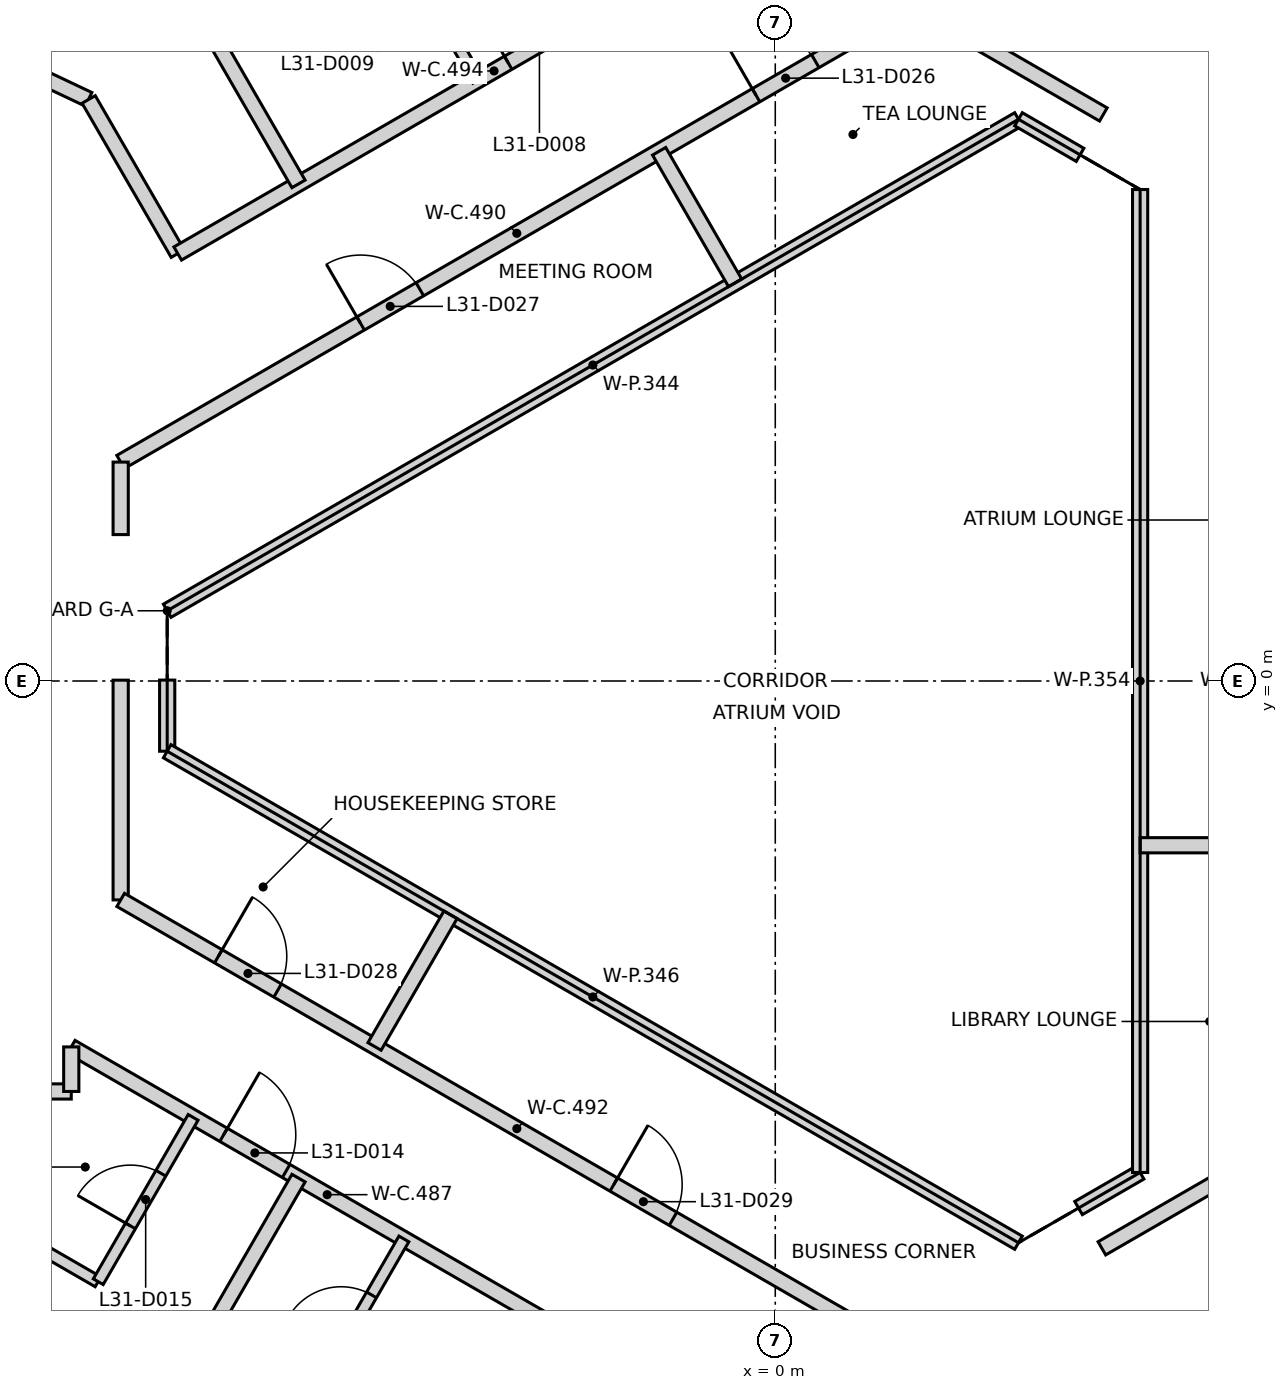
"""IFC4 building model, lengths in metres.
Left out: names, types, materials, properties, quantities, classifications, styles, units other than length and angle.
Written with IfcOpenShell. Run it as: python <this file> out.ifc"""

import sys

from ifc_helpers import new_model, si_unit, direction, frame, frame_2d, origin, place, context, subcontext, project, spatial, rectangle, extrude, element, fill, save


model = new_model("IFC4")
c1 = context("Model", 3, precision=1e-05, world=origin(), true_north=direction((0.0, 1.0)))
c2 = subcontext(c1, "Body", "Model", "MODEL_VIEW")
j1 = project(units=[si_unit("LENGTHUNIT", "METRE"), si_unit("PLANEANGLEUNIT", "RADIAN")], contexts=[c1])
p1 = place(None, origin())
s1 = spatial("IfcSite", under=j1, at=p1, CompositionType="ELEMENT")
p2 = place(p1, origin())
s2 = spatial("IfcBuilding", under=s1, at=p2, CompositionType="ELEMENT")
p3 = place(p2, frame((0.0, 0.0, 128.8)))
s3 = spatial("IfcBuildingStorey", under=s2, at=p3, CompositionType="ELEMENT", Elevation=128.8)
p4 = place(p3, frame((10.42, 6.498, 0.0), z_axis=(0.0, 0.0, 1.0), x_axis=(-0.866021906294, 0.500006057782, 0.0)))
e1 = element("IfcWall", 1, at=p4, inside=s3, PredefinedType="SHEAR", context=c2, shape_type="SweptSolid", body=[
    extrude(rectangle(XDim=11.55, YDim=0.25, at=frame_2d((5.775, 0.0))), origin(), (0.0, 0.0, 1.0), 3.2),
])
p5 = place(p4, frame((10.025, 0.0, 0.0)))
e2 = element("IfcOpeningElement", 2, at=p5, cuts=e1, PredefinedType="OPENING", context=c2, shape_type="SweptSolid", body=[
    extrude(rectangle(XDim=1.2, YDim=2.1, at=frame_2d((0.6, 1.05))), frame((0.0, 0.135, 0.0), z_axis=(0.0, -1.0, 0.0), x_axis=(1.0, 0.0, 0.0)), (0.0, 0.0, 1.0), 0.27),
])
p6 = place(p4, frame((8.725, 0.0, 0.0)))
e3 = element("IfcOpeningElement", 3, at=p6, cuts=e1, PredefinedType="OPENING", context=c2, shape_type="SweptSolid", body=[
    extrude(rectangle(XDim=1.2, YDim=2.1, at=frame_2d((0.6, 1.05))), frame((0.0, 0.135, 0.0), z_axis=(0.0, -1.0, 0.0), x_axis=(1.0, 0.0, 0.0)), (0.0, 0.0, 1.0), 0.27),
])
p7 = place(p3, frame((0.417, -12.273, 0.0), z_axis=(0.0, 0.0, 1.0), x_axis=(0.866021906294, 0.500006057782, 0.0)))
e4 = element("IfcWall", 4, at=p7, inside=s3, PredefinedType="SHEAR", context=c2, shape_type="SweptSolid", body=[
    extrude(rectangle(XDim=11.55, YDim=0.25, at=frame_2d((5.775, 0.0))), origin(), (0.0, 0.0, 1.0), 3.2),
])
p8 = place(p7, frame((10.025, 0.0, 0.0)))
e5 = element("IfcOpeningElement", 5, at=p8, cuts=e4, PredefinedType="OPENING", context=c2, shape_type="SweptSolid", body=[
    extrude(rectangle(XDim=1.2, YDim=2.1, at=frame_2d((0.6, 1.05))), frame((0.0, 0.135, 0.0), z_axis=(0.0, -1.0, 0.0), x_axis=(1.0, 0.0, 0.0)), (0.0, 0.0, 1.0), 0.27),
])
p9 = place(p7, frame((8.725, 0.0, 0.0)))
e6 = element("IfcOpeningElement", 6, at=p9, cuts=e4, PredefinedType="OPENING", context=c2, shape_type="SweptSolid", body=[
    extrude(rectangle(XDim=1.2, YDim=2.1, at=frame_2d((0.6, 1.05))), frame((0.0, 0.135, 0.0), z_axis=(0.0, -1.0, 0.0), x_axis=(1.0, 0.0, 0.0)), (0.0, 0.0, 1.0), 0.27),
])
p10 = place(p3, frame((-10.617, -5.4, 0.0), z_axis=(0.0, 0.0, 1.0), x_axis=(1.0, 0.0, 0.0)))
e7 = element("IfcWall", 7, at=p10, inside=s3, PredefinedType="PARTITIONING", context=c2, shape_type="SweptSolid", body=[
    extrude(rectangle(XDim=1.355, YDim=0.2, at=frame_2d((0.677, 0.0))), origin(), (0.0, 0.0, 1.0), 3.2),
])
p11 = place(p3, frame((-10.141, 8.176, 0.0), z_axis=(0.0, 0.0, 1.0), x_axis=(0.903904169039, -0.427735026849, 0.0)))
e8 = element("IfcWall", 8, at=p11, inside=s3, PredefinedType="PARTITIONING", context=c2, shape_type="SweptSolid", body=[
    extrude(rectangle(XDim=1.225, YDim=0.2, at=frame_2d((0.612, 0.0))), origin(), (0.0, 0.0, 1.0), 3.2),
])
p12 = place(p3, frame((-9.262, -4.814, 0.0), z_axis=(0.0, 0.0, 1.0), x_axis=(0.866109782156, -0.499853823887, 0.0)))
e9 = element("IfcWall", 9, at=p12, inside=s3, PredefinedType="PARTITIONING", context=c2, shape_type="SweptSolid", body=[
    extrude(rectangle(XDim=7.776, YDim=0.2, at=frame_2d((3.888, 0.0))), origin(), (0.0, 0.0, 1.0), 3.2),
])
p13 = place(p12, frame((2.314, 0.0, 0.0)))
e10 = element("IfcOpeningElement", 10, at=p13, cuts=e9, PredefinedType="OPENING", context=c2, shape_type="SweptSolid", body=[
    extrude(rectangle(XDim=0.95, YDim=2.1, at=frame_2d((0.475, 1.05))), frame((0.0, 0.11, 0.0), z_axis=(0.0, -1.0, 0.0), x_axis=(1.0, 0.0, 0.0)), (0.0, 0.0, 1.0), 0.22),
])
p14 = place(p3, frame((-9.262, -5.4, 0.0), z_axis=(0.0, 0.0, 1.0), x_axis=(0.0, 1.0, 0.0)))
e11 = element("IfcWall", 11, at=p14, inside=s3, PredefinedType="PARTITIONING", context=c2, shape_type="SweptSolid", body=[
    extrude(rectangle(XDim=0.586, YDim=0.2, at=frame_2d((0.293, 0.0))), origin(), (0.0, 0.0, 1.0), 3.2),
])
p15 = place(p3, frame((-9.033, 7.651, 0.0), z_axis=(0.0, 0.0, 1.0), x_axis=(0.500354010599, -0.865820919173, 0.0)))
e12 = element("IfcWall", 12, at=p15, inside=s3, PredefinedType="PARTITIONING", context=c2, shape_type="SweptSolid", body=[
    extrude(rectangle(XDim=2.342, YDim=0.2, at=frame_2d((1.171, 0.0))), origin(), (0.0, 0.0, 1.0), 3.2),
])
p16 = place(p3, frame((-8.613, 2.881, 0.0), z_axis=(0.0, 0.0, 1.0), x_axis=(0.866103179807, 0.499865263774, 0.0)))
e13 = element("IfcWall", 13, at=p16, inside=s3, PredefinedType="PARTITIONING", context=c2, shape_type="SweptSolid", body=[
    extrude(rectangle(XDim=12.036, YDim=0.2, at=frame_2d((6.018, 0.0))), origin(), (0.0, 0.0, 1.0), 3.2),
])
p17 = place(p16, frame((9.652, 0.0, 0.0)))
e14 = element("IfcOpeningElement", 14, at=p17, cuts=e13, PredefinedType="OPENING", context=c2, shape_type="SweptSolid", body=[
    extrude(rectangle(XDim=0.9, YDim=2.1, at=frame_2d((0.45, 1.05))), frame((0.0, 0.11, 0.0), z_axis=(0.0, -1.0, 0.0), x_axis=(1.0, 0.0, 0.0)), (0.0, 0.0, 1.0), 0.22),
])
p18 = place(p16, frame((3.646, 0.0, 0.0)))
e15 = element("IfcOpeningElement", 15, at=p18, cuts=e13, PredefinedType="OPENING", context=c2, shape_type="SweptSolid", body=[
    extrude(rectangle(XDim=0.9, YDim=2.1, at=frame_2d((0.45, 1.05))), frame((0.0, 0.11, 0.0), z_axis=(0.0, -1.0, 0.0), x_axis=(1.0, 0.0, 0.0)), (0.0, 0.0, 1.0), 0.22),
])
p19 = place(p3, frame((-8.612, -2.88, 0.0), z_axis=(0.0, 0.0, 1.0), x_axis=(0.0, 1.0, 0.0)))
e16 = element("IfcWall", 16, at=p19, inside=s3, PredefinedType="PARTITIONING", context=c2, shape_type="SweptSolid", body=[
    extrude(rectangle(XDim=2.891, YDim=0.2, at=frame_2d((1.445, 0.0))), origin(), (0.0, 0.0, 1.0), 2.3),
])
p20 = place(p3, frame((-8.612, -2.88, 0.0), z_axis=(0.0, 0.0, 1.0), x_axis=(0.866035279512, -0.499982894348, 0.0)))
e17 = element("IfcWall", 17, at=p20, inside=s3, PredefinedType="PARTITIONING", context=c2, shape_type="SweptSolid", body=[
    extrude(rectangle(XDim=12.037, YDim=0.2, at=frame_2d((6.018, 0.0))), origin(), (0.0, 0.0, 1.0), 3.2),
])
p21 = place(p20, frame((1.484, 0.0, 0.0)))
e18 = element("IfcOpeningElement", 18, at=p21, cuts=e17, PredefinedType="OPENING", context=c2, shape_type="SweptSolid", body=[
    extrude(rectangle(XDim=0.9, YDim=2.1, at=frame_2d((0.45, 1.05))), frame((0.0, 0.11, 0.0), z_axis=(0.0, -1.0, 0.0), x_axis=(1.0, 0.0, 0.0)), (0.0, 0.0, 1.0), 0.22),
])
p22 = place(p20, frame((7.491, 0.0, 0.0)))
e19 = element("IfcOpeningElement", 19, at=p22, cuts=e17, PredefinedType="OPENING", context=c2, shape_type="SweptSolid", body=[
    extrude(rectangle(XDim=0.9, YDim=2.1, at=frame_2d((0.45, 1.05))), frame((0.0, 0.11, 0.0), z_axis=(0.0, -1.0, 0.0), x_axis=(1.0, 0.0, 0.0)), (0.0, 0.0, 1.0), 0.22),
])
p23 = place(p3, frame((-8.612, 1.926, 0.0), z_axis=(0.0, 0.0, 1.0), x_axis=(0.0, 1.0, 0.0)))
e20 = element("IfcWall", 20, at=p23, inside=s3, PredefinedType="PARTITIONING", context=c2, shape_type="SweptSolid", body=[
    extrude(rectangle(XDim=0.954, YDim=0.2, at=frame_2d((0.477, 0.0))), origin(), (0.0, 0.0, 1.0), 3.2),
])
p24 = place(p3, frame((-7.862, 5.624, 0.0), z_axis=(0.0, 0.0, 1.0), x_axis=(0.866109024618, 0.499855136491, 0.0)))
e21 = element("IfcWall", 21, at=p24, inside=s3, PredefinedType="PARTITIONING", context=c2, shape_type="SweptSolid", body=[
    extrude(rectangle(XDim=9.61, YDim=0.2, at=frame_2d((4.805, 0.0))), origin(), (0.0, 0.0, 1.0), 3.2),
])
p25 = place(p24, frame((6.345, 0.0, 0.0)))
e22 = element("IfcOpeningElement", 22, at=p25, cuts=e21, PredefinedType="OPENING", context=c2, shape_type="SweptSolid", body=[
    extrude(rectangle(XDim=0.95, YDim=2.1, at=frame_2d((0.475, 1.05))), frame((0.0, 0.11, 0.0), z_axis=(0.0, -1.0, 0.0), x_axis=(1.0, 0.0, 0.0)), (0.0, 0.0, 1.0), 0.22),
])
p26 = place(p24, frame((5.02, 0.0, 0.0)))
e23 = element("IfcOpeningElement", 23, at=p26, cuts=e21, PredefinedType="OPENING", context=c2, shape_type="SweptSolid", body=[
    extrude(rectangle(XDim=0.95, YDim=2.1, at=frame_2d((0.475, 1.05))), frame((0.0, 0.11, 0.0), z_axis=(0.0, -1.0, 0.0), x_axis=(1.0, 0.0, 0.0)), (0.0, 0.0, 1.0), 0.22),
])
p27 = place(p3, frame((1.813, 8.899, 0.0), z_axis=(0.0, 0.0, 1.0), x_axis=(0.865957732194, -0.50011719232, 0.0)))
e24 = element("IfcWall", 24, at=p27, inside=s3, PredefinedType="PARTITIONING", context=c2, shape_type="SweptSolid", body=[
    extrude(rectangle(XDim=2.891, YDim=0.2, at=frame_2d((1.445, 0.0))), origin(), (0.0, 0.0, 1.0), 2.3),
])
p28 = place(p3, frame((4.297, -7.464, 0.0), z_axis=(0.0, 0.0, 1.0), x_axis=(0.86602521942, 0.500000319328, 0.0)))
e25 = element("IfcWall", 25, at=p28, inside=s3, PredefinedType="PARTITIONING", context=c2, shape_type="SweptSolid", body=[
    extrude(rectangle(XDim=2.89, YDim=0.2, at=frame_2d((1.445, 0.0))), origin(), (0.0, 0.0, 1.0), 2.3),
])
p29 = place(p3, frame((-12.279, 16.946, 0.0), z_axis=(0.0, 0.0, 1.0), x_axis=(0.499902454835, -0.866081714187, 0.0)))
e26 = element("IfcWall", 26, at=p29, inside=s3, PredefinedType="PARTITIONING", context=c2, shape_type="SweptSolid", body=[
    extrude(rectangle(XDim=12.015, YDim=0.2, at=frame_2d((6.008, 0.0))), origin(), (0.0, 0.0, 1.0), 3.2),
])
p30 = place(p3, frame((-12.278, -16.946, 0.0), z_axis=(0.0, 0.0, 1.0), x_axis=(0.499887212932, 0.866090511637, 0.0)))
e27 = element("IfcWall", 27, at=p30, inside=s3, PredefinedType="PARTITIONING", context=c2, shape_type="SweptSolid", body=[
    extrude(rectangle(XDim=12.015, YDim=0.2, at=frame_2d((6.007, 0.0))), origin(), (0.0, 0.0, 1.0), 3.2),
])
p31 = place(p3, frame((-8.0, 0.924, 0.0), z_axis=(0.0, 0.0, 1.0), x_axis=(0.86604129137, 0.499972480886, 0.0)))
e28 = element("IfcWall", 28, at=p31, inside=s3, PredefinedType="PARTITIONING", context=c2, shape_type="SweptSolid", body=[
    extrude(rectangle(XDim=12.932, YDim=0.2, at=frame_2d((6.466, 0.0))), origin(), (0.0, 0.0, 1.0), 2.3),
])
p32 = place(p3, frame((-8.0, -0.924, 0.0), z_axis=(0.0, 0.0, 1.0), x_axis=(0.0, 1.0, 0.0)))
e29 = element("IfcWall", 29, at=p32, inside=s3, PredefinedType="PARTITIONING", context=c2, shape_type="SweptSolid", body=[
    extrude(rectangle(XDim=0.936, YDim=0.2, at=frame_2d((0.468, 0.0))), origin(), (0.0, 0.0, 1.0), 2.3),
])
p33 = place(p3, frame((-8.0, -0.924, 0.0), z_axis=(0.0, 0.0, 1.0), x_axis=(0.86604129137, -0.499972480886, 0.0)))
e30 = element("IfcWall", 30, at=p33, inside=s3, PredefinedType="PARTITIONING", context=c2, shape_type="SweptSolid", body=[
    extrude(rectangle(XDim=12.932, YDim=0.2, at=frame_2d((6.466, 0.0))), origin(), (0.0, 0.0, 1.0), 2.3),
])
p34 = place(p3, frame((-5.272, -4.808, 0.0), z_axis=(0.0, 0.0, 1.0), x_axis=(0.499880961361, 0.866094119867, 0.0)))
e31 = element("IfcWall", 31, at=p34, inside=s3, PredefinedType="PARTITIONING", context=c2, shape_type="SweptSolid", body=[
    extrude(rectangle(XDim=2.0, YDim=0.2, at=frame_2d((1.0, 0.0))), origin(), (0.0, 0.0, 1.0), 2.3),
])
p35 = place(p3, frame((-1.528, 6.969, 0.0), z_axis=(0.0, 0.0, 1.0), x_axis=(0.500000846469, -0.866024915075, 0.0)))
e32 = element("IfcWall", 32, at=p35, inside=s3, PredefinedType="PARTITIONING", context=c2, shape_type="SweptSolid", body=[
    extrude(rectangle(XDim=1.999, YDim=0.2, at=frame_2d((1.0, 0.0))), origin(), (0.0, 0.0, 1.0), 3.2),
])
p36 = place(p3, frame((3.2, 7.39, 0.0), z_axis=(0.0, 0.0, 1.0), x_axis=(0.865985641702, -0.500068863623, 0.0)))
e33 = element("IfcWall", 33, at=p36, inside=s3, PredefinedType="PARTITIONING", context=c2, shape_type="SweptSolid", body=[
    extrude(rectangle(XDim=0.935, YDim=0.2, at=frame_2d((0.468, 0.0))), origin(), (0.0, 0.0, 1.0), 2.3),
])
p37 = place(p3, frame((3.99, -6.934, 0.0), z_axis=(0.0, 0.0, 1.0), x_axis=(0.865872609263, 0.500264554538, 0.0)))
e34 = element("IfcWall", 34, at=p37, inside=s3, PredefinedType="PARTITIONING", context=c2, shape_type="SweptSolid", body=[
    extrude(rectangle(XDim=0.936, YDim=0.2, at=frame_2d((0.468, 0.0))), origin(), (0.0, 0.0, 1.0), 2.3),
])
p38 = place(p3, frame((4.8, -6.466, 0.0), z_axis=(0.0, 0.0, 1.0), x_axis=(0.0, 1.0, 0.0)))
e35 = element("IfcWall", 35, at=p38, inside=s3, PredefinedType="PARTITIONING", context=c2, shape_type="SweptSolid", body=[
    extrude(rectangle(XDim=12.932, YDim=0.2, at=frame_2d((6.466, 0.0))), origin(), (0.0, 0.0, 1.0), 2.3),
])
p39 = place(p3, frame((4.8, -2.161, 0.0), z_axis=(0.0, 0.0, 1.0), x_axis=(1.0, 0.0, 0.0)))
e36 = element("IfcWall", 36, at=p39, inside=s3, PredefinedType="PARTITIONING", context=c2, shape_type="SweptSolid", body=[
    extrude(rectangle(XDim=2.0, YDim=0.2, at=frame_2d((1.0, 0.0))), origin(), (0.0, 0.0, 1.0), 2.3),
])
p40 = place(p3, frame((-10.51, -6.98, 0.0), z_axis=(0.0, 0.0, 1.0), x_axis=(0.865965533559, -0.500103683937, 0.0)))
e37 = element("IfcWall", 37, at=p40, inside=s3, PredefinedType="PARTITIONING", context=c2, shape_type="SweptSolid", body=[
    extrude(rectangle(XDim=1.848, YDim=0.15, at=frame_2d((0.924, 0.0))), origin(), (0.0, 0.0, 1.0), 3.2),
])
p41 = place(p3, frame((-8.907, -7.903, 0.0), z_axis=(0.0, 0.0, 1.0), x_axis=(0.499925626596, 0.866068339032, 0.0)))
e38 = element("IfcWall", 38, at=p41, inside=s3, PredefinedType="PARTITIONING", context=c2, shape_type="SweptSolid", body=[
    extrude(rectangle(XDim=2.497, YDim=0.15, at=frame_2d((1.248, 0.0))), origin(), (0.0, 0.0, 1.0), 3.2),
])
p42 = place(p41, frame((0.848, 0.0, 0.0)))
e39 = element("IfcOpeningElement", 39, at=p42, cuts=e38, PredefinedType="OPENING", context=c2, shape_type="SweptSolid", body=[
    extrude(rectangle(XDim=0.8, YDim=2.1, at=frame_2d((0.4, 1.05))), frame((0.0, 0.085, 0.0), z_axis=(0.0, -1.0, 0.0), x_axis=(1.0, 0.0, 0.0)), (0.0, 0.0, 1.0), 0.17),
])
p43 = place(p3, frame((-6.137, -9.505, 0.0), z_axis=(0.0, 0.0, 1.0), x_axis=(0.500339416332, 0.86582935297, 0.0)))
e40 = element("IfcWall", 40, at=p43, inside=s3, PredefinedType="PARTITIONING", context=c2, shape_type="SweptSolid", body=[
    extrude(rectangle(XDim=2.5, YDim=0.15, at=frame_2d((1.25, 0.0))), origin(), (0.0, 0.0, 1.0), 3.2),
])
p44 = place(p43, frame((0.85, 0.0, 0.0)))
e41 = element("IfcOpeningElement", 41, at=p44, cuts=e40, PredefinedType="OPENING", context=c2, shape_type="SweptSolid", body=[
    extrude(rectangle(XDim=0.8, YDim=2.1, at=frame_2d((0.4, 1.05))), frame((0.0, 0.085, 0.0), z_axis=(0.0, -1.0, 0.0), x_axis=(1.0, 0.0, 0.0)), (0.0, 0.0, 1.0), 0.17),
])
p45 = place(p3, frame((-5.164, 10.067, 0.0), z_axis=(0.0, 0.0, 1.0), x_axis=(0.500046524342, -0.865998541277, 0.0)))
e42 = element("IfcWall", 42, at=p45, inside=s3, PredefinedType="PARTITIONING", context=c2, shape_type="SweptSolid", body=[
    extrude(rectangle(XDim=2.5, YDim=0.15, at=frame_2d((1.25, 0.0))), origin(), (0.0, 0.0, 1.0), 3.2),
])
p46 = place(p45, frame((0.85, 0.0, 0.0)))
e43 = element("IfcOpeningElement", 43, at=p46, cuts=e42, PredefinedType="OPENING", context=c2, shape_type="SweptSolid", body=[
    extrude(rectangle(XDim=0.8, YDim=2.1, at=frame_2d((0.4, 1.05))), frame((0.0, 0.085, 0.0), z_axis=(0.0, -1.0, 0.0), x_axis=(1.0, 0.0, 0.0)), (0.0, 0.0, 1.0), 0.17),
])
p47 = place(p26, origin())
e44 = element("IfcDoor", 44, at=p47, inside=s3, OperationType="SINGLE_SWING_LEFT", PredefinedType="DOOR", context=c2, shape_type="SweptSolid", body=[
    extrude(rectangle(XDim=0.95, YDim=2.1, at=frame_2d((0.475, 1.05))), frame((0.0, 0.025, 0.0), z_axis=(0.0, -1.0, 0.0), x_axis=(1.0, 0.0, 0.0)), (0.0, 0.0, 1.0), 0.05),
])
fill(e23, e44)
p48 = place(p13, frame((0.95, 0.0, 0.0), z_axis=(0.0, 0.0, 1.0), x_axis=(-1.0, 0.0, 0.0)))
e45 = element("IfcDoor", 45, at=p48, inside=s3, OperationType="SINGLE_SWING_LEFT", PredefinedType="DOOR", context=c2, shape_type="SweptSolid", body=[
    extrude(rectangle(XDim=0.95, YDim=2.1, at=frame_2d((0.475, 1.05))), frame((0.0, 0.025, 0.0), z_axis=(0.0, -1.0, 0.0), x_axis=(1.0, 0.0, 0.0)), (0.0, 0.0, 1.0), 0.05),
])
fill(e10, e45)
p49 = place(p42, origin())
e46 = element("IfcDoor", 46, at=p49, inside=s3, OperationType="SINGLE_SWING_LEFT", PredefinedType="DOOR", context=c2, shape_type="SweptSolid", body=[
    extrude(rectangle(XDim=0.8, YDim=2.1, at=frame_2d((0.4, 1.05))), frame((0.0, 0.025, 0.0), z_axis=(0.0, -1.0, 0.0), x_axis=(1.0, 0.0, 0.0)), (0.0, 0.0, 1.0), 0.05),
])
fill(e39, e46)
p50 = place(p44, frame((0.8, 0.0, 0.0), z_axis=(0.0, 0.0, 1.0), x_axis=(-1.0, 0.0, 0.0)))
e47 = element("IfcDoor", 47, at=p50, inside=s3, OperationType="SINGLE_SWING_LEFT", PredefinedType="DOOR", context=c2, shape_type="SweptSolid", body=[
    extrude(rectangle(XDim=0.8, YDim=2.1, at=frame_2d((0.4, 1.05))), frame((0.0, 0.025, 0.0), z_axis=(0.0, -1.0, 0.0), x_axis=(1.0, 0.0, 0.0)), (0.0, 0.0, 1.0), 0.05),
])
fill(e41, e47)
p51 = place(p17, frame((0.9, 0.0, 0.0), z_axis=(0.0, 0.0, 1.0), x_axis=(-1.0, 0.0, 0.0)))
e48 = element("IfcDoor", 48, at=p51, inside=s3, OperationType="SINGLE_SWING_LEFT", PredefinedType="DOOR", context=c2, shape_type="SweptSolid", body=[
    extrude(rectangle(XDim=0.9, YDim=2.1, at=frame_2d((0.45, 1.05))), frame((0.0, 0.025, 0.0), z_axis=(0.0, -1.0, 0.0), x_axis=(1.0, 0.0, 0.0)), (0.0, 0.0, 1.0), 0.05),
])
fill(e14, e48)
p52 = place(p18, frame((0.9, 0.0, 0.0), z_axis=(0.0, 0.0, 1.0), x_axis=(-1.0, 0.0, 0.0)))
e49 = element("IfcDoor", 49, at=p52, inside=s3, OperationType="SINGLE_SWING_LEFT", PredefinedType="DOOR", context=c2, shape_type="SweptSolid", body=[
    extrude(rectangle(XDim=0.9, YDim=2.1, at=frame_2d((0.45, 1.05))), frame((0.0, 0.025, 0.0), z_axis=(0.0, -1.0, 0.0), x_axis=(1.0, 0.0, 0.0)), (0.0, 0.0, 1.0), 0.05),
])
fill(e15, e49)
p53 = place(p21, origin())
e50 = element("IfcDoor", 50, at=p53, inside=s3, OperationType="SINGLE_SWING_LEFT", PredefinedType="DOOR", context=c2, shape_type="SweptSolid", body=[
    extrude(rectangle(XDim=0.9, YDim=2.1, at=frame_2d((0.45, 1.05))), frame((0.0, 0.025, 0.0), z_axis=(0.0, -1.0, 0.0), x_axis=(1.0, 0.0, 0.0)), (0.0, 0.0, 1.0), 0.05),
])
fill(e18, e50)
p54 = place(p22, origin())
e51 = element("IfcDoor", 51, at=p54, inside=s3, OperationType="SINGLE_SWING_LEFT", PredefinedType="DOOR", context=c2, shape_type="SweptSolid", body=[
    extrude(rectangle(XDim=0.9, YDim=2.1, at=frame_2d((0.45, 1.05))), frame((0.0, 0.025, 0.0), z_axis=(0.0, -1.0, 0.0), x_axis=(1.0, 0.0, 0.0)), (0.0, 0.0, 1.0), 0.05),
])
fill(e19, e51)
save(model, sys.argv[1])
